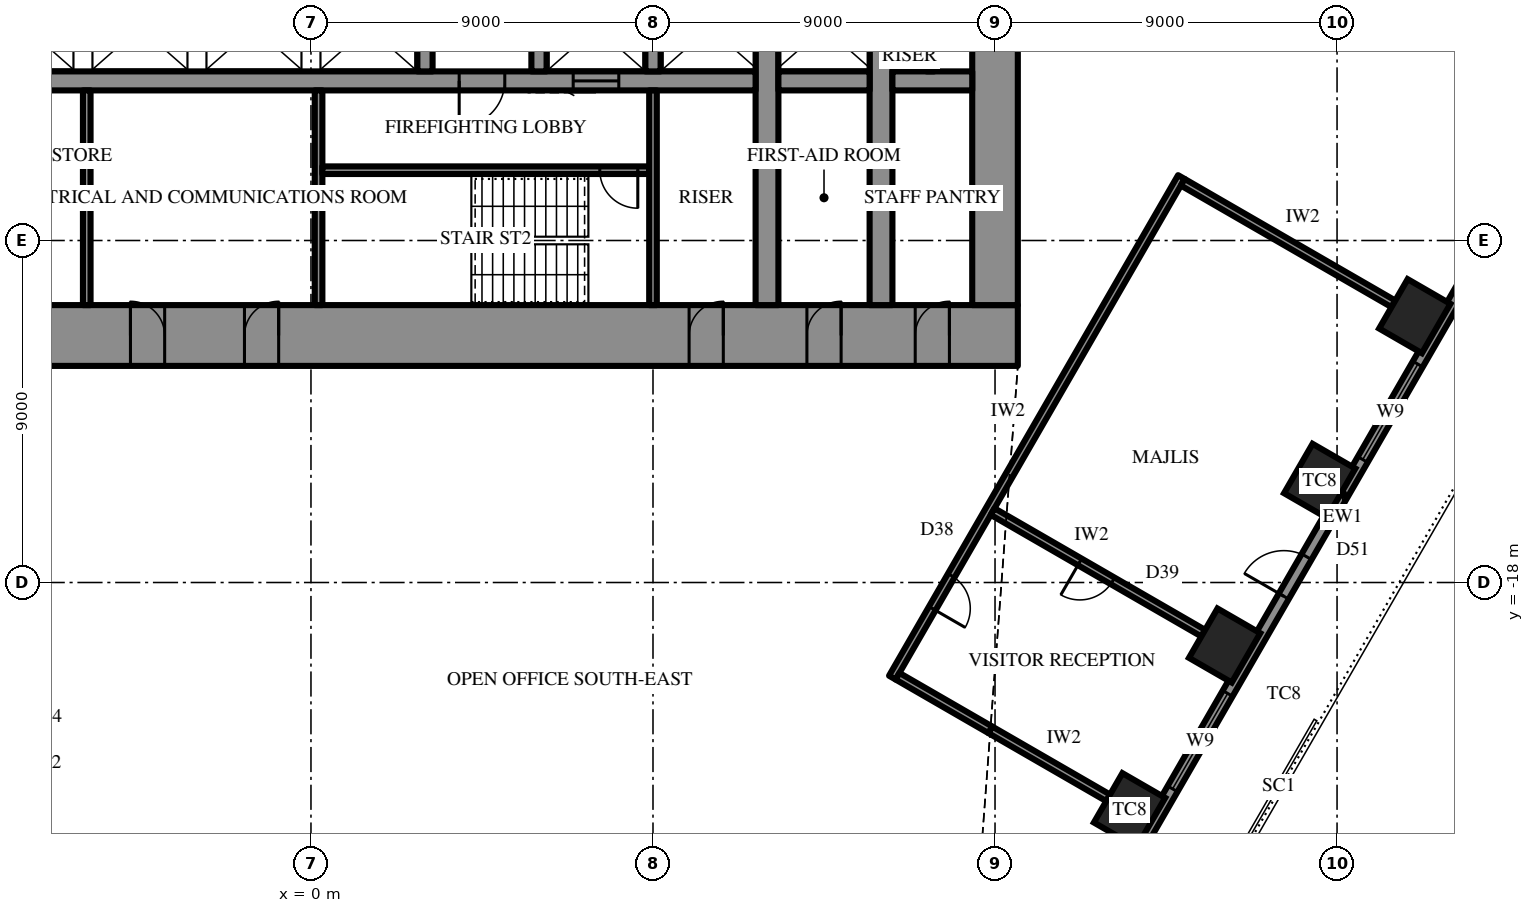
"""IFC4 building model, lengths in metres.
Left out: names, types, materials, properties, quantities, classifications, styles, units other than length and angle.
Written with IfcOpenShell. Run it as: python <this file> out.ifc"""

import sys

from ifc_helpers import new_model, si_unit, direction, frame, frame_2d, origin, origin_2d, place, context, subcontext, project, spatial, rectangle, extrude, element, fill, save


model = new_model("IFC4")
c1 = context("Model", 3, precision=1e-05, world=origin(), true_north=direction((0.0, 1.0)))
c2 = subcontext(c1, "Body", "Model", "MODEL_VIEW")
j1 = project(units=[si_unit("LENGTHUNIT", "METRE"), si_unit("PLANEANGLEUNIT", "RADIAN")], contexts=[c1])
p1 = place(None, origin())
s1 = spatial("IfcSite", under=j1, at=p1, CompositionType="ELEMENT")
p2 = place(p1, origin())
s2 = spatial("IfcBuilding", under=s1, at=p2, CompositionType="ELEMENT")
p3 = place(p2, frame((0.0, 0.0, 186.7)))
s3 = spatial("IfcBuildingStorey", under=s2, at=p3, CompositionType="ELEMENT", Elevation=186.7)
for number, where, z_axis, x_axis in (
    (1, (21.54, -23.992, 0.0), (0.0, 0.0, 1.0), (0.5, 0.866, 0.0)),
    (2, (24.042, -19.658, 0.0), (0.0, 0.0, 1.0), (0.5, 0.866, 0.0)),
    (3, (26.544, -15.325, 0.0), (0.0, 0.0, 1.0), (0.5, 0.866, 0.0)),
    (4, (29.045, -10.992, 0.0), (0.0, 0.0, 1.0), (0.5, 0.866, 0.0)),
):
    element("IfcColumn", number, at=place(p3, frame(where, z_axis=z_axis, x_axis=x_axis)), inside=s3, PredefinedType="COLUMN", context=c2, shape_type="SweptSolid", body=[
        extrude(rectangle(XDim=1.5, YDim=1.3, at=origin_2d()), origin(), (0.0, 0.0, 1.0), 4.2),
    ])
p4 = place(p3, frame((18.6, -11.5, 0.0), z_axis=(0.0, 0.0, 1.0), x_axis=(-1.0, 0.0, 0.0)))
e5 = element("IfcWall", 5, at=p4, inside=s3, PredefinedType="SHEAR", context=c2, shape_type="SweptSolid", body=[
    extrude(rectangle(XDim=37.2, YDim=1.6, at=frame_2d((18.6, 0.0))), origin(), (0.0, 0.0, 1.0), 4.2),
])
p5 = place(p4, frame((19.45, 0.0, 0.0)))
e6 = element("IfcOpeningElement", 6, at=p5, cuts=e5, PredefinedType="OPENING", context=c2, shape_type="SweptSolid", body=[
    extrude(rectangle(XDim=0.9, YDim=2.2, at=frame_2d((0.45, 1.1))), frame((0.0, 0.81, 0.0), z_axis=(0.0, -1.0, 0.0), x_axis=(1.0, 0.0, 0.0)), (0.0, 0.0, 1.0), 1.62),
])
p6 = place(p4, frame((22.45, 0.0, 0.0)))
e7 = element("IfcOpeningElement", 7, at=p6, cuts=e5, PredefinedType="OPENING", context=c2, shape_type="SweptSolid", body=[
    extrude(rectangle(XDim=0.9, YDim=2.2, at=frame_2d((0.45, 1.1))), frame((0.0, 0.81, 0.0), z_axis=(0.0, -1.0, 0.0), x_axis=(1.0, 0.0, 0.0)), (0.0, 0.0, 1.0), 1.62),
])
p7 = place(p4, frame((25.5, 0.0, 0.0)))
e8 = element("IfcOpeningElement", 8, at=p7, cuts=e5, PredefinedType="OPENING", context=c2, shape_type="SweptSolid", body=[
    extrude(rectangle(XDim=1.0, YDim=2.2, at=frame_2d((0.5, 1.1))), frame((0.0, 0.81, 0.0), z_axis=(0.0, -1.0, 0.0), x_axis=(1.0, 0.0, 0.0)), (0.0, 0.0, 1.0), 1.62),
])
p8 = place(p4, frame((1.8, 0.0, 0.0)))
e9 = element("IfcOpeningElement", 9, at=p8, cuts=e5, PredefinedType="OPENING", context=c2, shape_type="SweptSolid", body=[
    extrude(rectangle(XDim=0.9, YDim=2.2, at=frame_2d((0.45, 1.1))), frame((0.0, 0.81, 0.0), z_axis=(0.0, -1.0, 0.0), x_axis=(1.0, 0.0, 0.0)), (0.0, 0.0, 1.0), 1.62),
])
p9 = place(p4, frame((4.65, 0.0, 0.0)))
e10 = element("IfcOpeningElement", 10, at=p9, cuts=e5, PredefinedType="OPENING", context=c2, shape_type="SweptSolid", body=[
    extrude(rectangle(XDim=0.9, YDim=2.2, at=frame_2d((0.45, 1.1))), frame((0.0, 0.81, 0.0), z_axis=(0.0, -1.0, 0.0), x_axis=(1.0, 0.0, 0.0)), (0.0, 0.0, 1.0), 1.62),
])
p10 = place(p4, frame((7.75, 0.0, 0.0)))
e11 = element("IfcOpeningElement", 11, at=p10, cuts=e5, PredefinedType="OPENING", context=c2, shape_type="SweptSolid", body=[
    extrude(rectangle(XDim=0.9, YDim=2.2, at=frame_2d((0.45, 1.1))), frame((0.0, 0.81, 0.0), z_axis=(0.0, -1.0, 0.0), x_axis=(1.0, 0.0, 0.0)), (0.0, 0.0, 1.0), 1.62),
])
p11 = place(p4, frame((28.55, 0.0, 0.0)))
e12 = element("IfcOpeningElement", 12, at=p11, cuts=e5, PredefinedType="OPENING", context=c2, shape_type="SweptSolid", body=[
    extrude(rectangle(XDim=0.9, YDim=2.2, at=frame_2d((0.45, 1.1))), frame((0.0, 0.81, 0.0), z_axis=(0.0, -1.0, 0.0), x_axis=(1.0, 0.0, 0.0)), (0.0, 0.0, 1.0), 1.62),
])
p12 = place(p4, frame((31.65, 0.0, 0.0)))
e13 = element("IfcOpeningElement", 13, at=p12, cuts=e5, PredefinedType="OPENING", context=c2, shape_type="SweptSolid", body=[
    extrude(rectangle(XDim=0.9, YDim=2.2, at=frame_2d((0.45, 1.1))), frame((0.0, 0.81, 0.0), z_axis=(0.0, -1.0, 0.0), x_axis=(1.0, 0.0, 0.0)), (0.0, 0.0, 1.0), 1.62),
])
p13 = place(p4, frame((34.5, 0.0, 0.0)))
e14 = element("IfcOpeningElement", 14, at=p13, cuts=e5, PredefinedType="OPENING", context=c2, shape_type="SweptSolid", body=[
    extrude(rectangle(XDim=0.9, YDim=2.2, at=frame_2d((0.45, 1.1))), frame((0.0, 0.81, 0.0), z_axis=(0.0, -1.0, 0.0), x_axis=(1.0, 0.0, 0.0)), (0.0, 0.0, 1.0), 1.62),
])
p14 = place(p3, frame((18.0, -10.7, 0.0), z_axis=(0.0, 0.0, 1.0), x_axis=(0.0, 1.0, 0.0)))
e15 = element("IfcWall", 15, at=p14, inside=s3, PredefinedType="SHEAR", context=c2, shape_type="SweptSolid", body=[
    extrude(rectangle(XDim=21.4, YDim=1.2, at=frame_2d((10.7, 0.0))), origin(), (0.0, 0.0, 1.0), 4.2),
])
p15 = place(p14, frame((9.8, 0.0, 0.0)))
e16 = element("IfcOpeningElement", 16, at=p15, cuts=e15, PredefinedType="OPENING", context=c2, shape_type="SweptSolid", body=[
    extrude(rectangle(XDim=1.8, YDim=2.4, at=frame_2d((0.9, 1.2))), frame((0.0, 0.61, 0.0), z_axis=(0.0, -1.0, 0.0), x_axis=(1.0, 0.0, 0.0)), (0.0, 0.0, 1.0), 1.22),
])
p16 = place(p3, frame((12.0, -10.7, 0.0), z_axis=(0.0, 0.0, 1.0), x_axis=(0.0, 1.0, 0.0)))
e17 = element("IfcWall", 17, at=p16, inside=s3, PredefinedType="SHEAR", context=c2, shape_type="SweptSolid", body=[
    extrude(rectangle(XDim=21.4, YDim=0.6, at=frame_2d((10.7, 0.0))), origin(), (0.0, 0.0, 1.0), 4.2),
])
p17 = place(p16, frame((9.8, 0.0, 0.0)))
e18 = element("IfcOpeningElement", 18, at=p17, cuts=e17, PredefinedType="OPENING", context=c2, shape_type="SweptSolid", body=[
    extrude(rectangle(XDim=1.8, YDim=2.4, at=frame_2d((0.9, 1.2))), frame((0.0, 0.31, 0.0), z_axis=(0.0, -1.0, 0.0), x_axis=(1.0, 0.0, 0.0)), (0.0, 0.0, 1.0), 0.62),
])
p18 = place(p3, frame((15.0, -10.7, 0.0), z_axis=(0.0, 0.0, 1.0), x_axis=(0.0, 1.0, 0.0)))
e19 = element("IfcWall", 19, at=p18, inside=s3, PredefinedType="SHEAR", context=c2, shape_type="SweptSolid", body=[
    extrude(rectangle(XDim=21.4, YDim=0.6, at=frame_2d((10.7, 0.0))), origin(), (0.0, 0.0, 1.0), 4.2),
])
p19 = place(p18, frame((9.8, 0.0, 0.0)))
e20 = element("IfcOpeningElement", 20, at=p19, cuts=e19, PredefinedType="OPENING", context=c2, shape_type="SweptSolid", body=[
    extrude(rectangle(XDim=1.8, YDim=2.4, at=frame_2d((0.9, 1.2))), frame((0.0, 0.31, 0.0), z_axis=(0.0, -1.0, 0.0), x_axis=(1.0, 0.0, 0.0)), (0.0, 0.0, 1.0), 0.62),
])
p20 = place(p3, frame((17.4, -4.8, 0.0), z_axis=(0.0, 0.0, 1.0), x_axis=(-1.0, 0.0, 0.0)))
e21 = element("IfcWall", 21, at=p20, inside=s3, PredefinedType="SHEAR", context=c2, shape_type="SweptSolid", body=[
    extrude(rectangle(XDim=2.1, YDim=0.5, at=frame_2d((1.05, 0.0))), origin(), (0.0, 0.0, 1.0), 4.2),
])
p21 = place(p3, frame((14.7, -4.8, 0.0), z_axis=(0.0, 0.0, 1.0), x_axis=(-1.0, 0.0, 0.0)))
e22 = element("IfcWall", 22, at=p21, inside=s3, PredefinedType="SHEAR", context=c2, shape_type="SweptSolid", body=[
    extrude(rectangle(XDim=2.4, YDim=0.5, at=frame_2d((1.2, 0.0))), origin(), (0.0, 0.0, 1.0), 4.2),
])
p22 = place(p3, frame((11.7, -4.8, 0.0), z_axis=(0.0, 0.0, 1.0), x_axis=(-1.0, 0.0, 0.0)))
e23 = element("IfcWall", 23, at=p22, inside=s3, PredefinedType="SHEAR", context=c2, shape_type="SweptSolid", body=[
    extrude(rectangle(XDim=23.4, YDim=0.5, at=frame_2d((11.7, 0.0))), origin(), (0.0, 0.0, 1.0), 4.2),
])
p23 = place(p22, frame((6.6, 0.0, 0.0)))
e24 = element("IfcOpeningElement", 24, at=p23, cuts=e23, PredefinedType="OPENING", context=c2, shape_type="SweptSolid", body=[
    extrude(rectangle(XDim=1.2, YDim=2.2, at=frame_2d((0.6, 1.1))), frame((0.0, 0.26, 0.0), z_axis=(0.0, -1.0, 0.0), x_axis=(1.0, 0.0, 0.0)), (0.0, 0.0, 1.0), 0.52),
])
p24 = place(p22, frame((3.6, 0.0, 0.0)))
e25 = element("IfcOpeningElement", 25, at=p24, cuts=e23, PredefinedType="OPENING", context=c2, shape_type="SweptSolid", body=[
    extrude(rectangle(XDim=1.2, YDim=2.2, at=frame_2d((0.6, 1.1))), frame((0.0, 0.26, 0.0), z_axis=(0.0, -1.0, 0.0), x_axis=(1.0, 0.0, 0.0)), (0.0, 0.0, 1.0), 0.52),
])
for number, where, z_axis, x_axis in (
    (26, (9.0, -2.25, 0.0), (0.0, 0.0, 1.0), (0.0, -1.0, 0.0)),
    (27, (6.0, -2.25, 0.0), (0.0, 0.0, 1.0), (0.0, -1.0, 0.0)),
    (28, (3.0, -2.25, 0.0), (0.0, 0.0, 1.0), (0.0, -1.0, 0.0)),
):
    element("IfcWall", number, at=place(p3, frame(where, z_axis=z_axis, x_axis=x_axis)), inside=s3, PredefinedType="SHEAR", context=c2, shape_type="SweptSolid", body=[
        extrude(rectangle(XDim=2.3, YDim=0.4, at=frame_2d((1.15, 0.0))), origin(), (0.0, 0.0, 1.0), 4.2),
    ])
p25 = place(p3, frame((0.2, -5.05, 0.0), z_axis=(0.0, 0.0, 1.0), x_axis=(0.0, -1.0, 0.0)))
e29 = element("IfcWall", 29, at=p25, inside=s3, PredefinedType="SHEAR", context=c2, shape_type="SweptSolid", body=[
    extrude(rectangle(XDim=5.65, YDim=0.2, at=frame_2d((2.825, 0.0))), origin(), (0.0, 0.0, 1.0), 4.2),
])
p26 = place(p3, frame((8.9, -7.15, 0.0), z_axis=(0.0, 0.0, 1.0), x_axis=(-1.0, 0.0, 0.0)))
e30 = element("IfcWall", 30, at=p26, inside=s3, PredefinedType="SHEAR", context=c2, shape_type="SweptSolid", body=[
    extrude(rectangle(XDim=8.6, YDim=0.2, at=frame_2d((4.3, 0.0))), origin(), (0.0, 0.0, 1.0), 4.2),
])
p27 = place(p26, frame((0.3, 0.0, 0.0)))
e31 = element("IfcOpeningElement", 31, at=p27, cuts=e30, PredefinedType="OPENING", context=c2, shape_type="SweptSolid", body=[
    extrude(rectangle(XDim=1.0, YDim=2.2, at=frame_2d((0.5, 1.1))), frame((0.0, 0.11, 0.0), z_axis=(0.0, -1.0, 0.0), x_axis=(1.0, 0.0, 0.0)), (0.0, 0.0, 1.0), 0.22),
])
p28 = place(p3, frame((19.644, -28.675, 0.0), z_axis=(0.0, 0.0, 1.0), x_axis=(0.500003084452, 0.866023622968, 0.0)))
e32 = element("IfcWall", 32, at=p28, inside=s3, PredefinedType="SOLIDWALL", context=c2, shape_type="SweptSolid", body=[
    extrude(rectangle(XDim=30.022, YDim=0.3, at=frame_2d((15.011, 0.0))), origin(), (0.0, 0.0, 1.0), 2.75),
])
p29 = place(p28, frame((1.052, 0.0, 0.6)))
e33 = element("IfcOpeningElement", 33, at=p29, cuts=e32, PredefinedType="OPENING", context=c2, shape_type="SweptSolid", body=[
    extrude(rectangle(XDim=2.9, YDim=1.9, at=frame_2d((1.45, 0.95))), frame((0.0, 0.16, 0.0), z_axis=(0.0, -1.0, 0.0), x_axis=(1.0, 0.0, 0.0)), (0.0, 0.0, 1.0), 0.32),
])
p30 = place(p28, frame((6.056, 0.0, 0.6)))
e34 = element("IfcOpeningElement", 34, at=p30, cuts=e32, PredefinedType="OPENING", context=c2, shape_type="SweptSolid", body=[
    extrude(rectangle(XDim=2.9, YDim=1.9, at=frame_2d((1.45, 0.95))), frame((0.0, 0.16, 0.0), z_axis=(0.0, -1.0, 0.0), x_axis=(1.0, 0.0, 0.0)), (0.0, 0.0, 1.0), 0.32),
])
p31 = place(p28, frame((11.909, 0.0, 0.0)))
e35 = element("IfcOpeningElement", 35, at=p31, cuts=e32, PredefinedType="OPENING", context=c2, shape_type="SweptSolid", body=[
    extrude(rectangle(XDim=1.2, YDim=2.4, at=frame_2d((0.6, 1.2))), frame((0.0, 0.16, 0.0), z_axis=(0.0, -1.0, 0.0), x_axis=(1.0, 0.0, 0.0)), (0.0, 0.0, 1.0), 0.32),
])
p32 = place(p28, frame((16.063, 0.0, 0.6)))
e36 = element("IfcOpeningElement", 36, at=p32, cuts=e32, PredefinedType="OPENING", context=c2, shape_type="SweptSolid", body=[
    extrude(rectangle(XDim=2.9, YDim=1.9, at=frame_2d((1.45, 0.95))), frame((0.0, 0.16, 0.0), z_axis=(0.0, -1.0, 0.0), x_axis=(1.0, 0.0, 0.0)), (0.0, 0.0, 1.0), 0.32),
])
p33 = place(p28, frame((21.067, 0.0, 0.6)))
e37 = element("IfcOpeningElement", 37, at=p33, cuts=e32, PredefinedType="OPENING", context=c2, shape_type="SweptSolid", body=[
    extrude(rectangle(XDim=2.9, YDim=1.9, at=frame_2d((1.45, 0.95))), frame((0.0, 0.16, 0.0), z_axis=(0.0, -1.0, 0.0), x_axis=(1.0, 0.0, 0.0)), (0.0, 0.0, 1.0), 0.32),
])
p34 = place(p28, frame((26.07, 0.0, 0.6)))
e38 = element("IfcOpeningElement", 38, at=p34, cuts=e32, PredefinedType="OPENING", context=c2, shape_type="SweptSolid", body=[
    extrude(rectangle(XDim=2.9, YDim=1.9, at=frame_2d((1.45, 0.95))), frame((0.0, 0.16, 0.0), z_axis=(0.0, -1.0, 0.0), x_axis=(1.0, 0.0, 0.0)), (0.0, 0.0, 1.0), 0.32),
])
for number, where, z_axis, x_axis in (
    (39, (9.0, -5.05, 0.0), (0.0, 0.0, 1.0), (0.0, -1.0, 0.0)),
    (40, (-5.9, -5.05, 0.0), (0.0, 0.0, 1.0), (0.0, -1.0, 0.0)),
):
    element("IfcWall", number, at=place(p3, frame(where, z_axis=z_axis, x_axis=x_axis)), inside=s3, PredefinedType="PARTITIONING", context=c2, shape_type="SweptSolid", body=[
        extrude(rectangle(XDim=5.65, YDim=0.2, at=frame_2d((2.825, 0.0))), origin(), (0.0, 0.0, 1.0), 4.0),
    ])
p35 = place(p3, frame((16.3, -3.55, 0.0), z_axis=(0.0, 0.0, 1.0), x_axis=(0.0, -1.0, 0.0)))
e41 = element("IfcWall", 41, at=p35, inside=s3, PredefinedType="PARTITIONING", context=c2, shape_type="SweptSolid", body=[
    extrude(rectangle(XDim=1.0, YDim=0.2, at=frame_2d((0.5, 0.0))), origin(), (0.0, 0.0, 1.0), 4.0),
])
p36 = place(p3, frame((15.298, -20.503, 0.0), z_axis=(0.0, 0.0, 1.0), x_axis=(0.500010972563, 0.86601906868, 0.0)))
e42 = element("IfcWall", 42, at=p36, inside=s3, PredefinedType="PARTITIONING", context=c2, shape_type="SweptSolid", body=[
    extrude(rectangle(XDim=15.211, YDim=0.2, at=frame_2d((7.605, 0.0))), origin(), (0.0, 0.0, 1.0), 4.0),
])
p37 = place(p36, frame((2.102, 0.0, 0.0)))
e43 = element("IfcOpeningElement", 43, at=p37, cuts=e42, PredefinedType="OPENING", context=c2, shape_type="SweptSolid", body=[
    extrude(rectangle(XDim=1.0, YDim=2.2, at=frame_2d((0.5, 1.1))), frame((0.0, 0.11, 0.0), z_axis=(0.0, -1.0, 0.0), x_axis=(1.0, 0.0, 0.0)), (0.0, 0.0, 1.0), 0.22),
])
p38 = place(p3, frame((15.435, -20.467, 0.0), z_axis=(0.0, 0.0, 1.0), x_axis=(0.866008320966, -0.500029587143, 0.0)))
e44 = element("IfcWall", 44, at=p38, inside=s3, PredefinedType="PARTITIONING", context=c2, shape_type="SweptSolid", body=[
    extrude(rectangle(XDim=2.821, YDim=0.2, at=frame_2d((1.411, 0.0))), origin(), (0.0, 0.0, 1.0), 4.0),
])
p39 = place(p3, frame((17.878, -21.877, 0.0), z_axis=(0.0, 0.0, 1.0), x_axis=(0.866009501729, -0.500027542156, 0.0)))
e45 = element("IfcWall", 45, at=p39, inside=s3, PredefinedType="PARTITIONING", context=c2, shape_type="SweptSolid", body=[
    extrude(rectangle(XDim=3.579, YDim=0.2, at=frame_2d((1.79, 0.0))), origin(), (0.0, 0.0, 1.0), 3.082),
])
p40 = place(p3, frame((17.936, -16.133, 0.0), z_axis=(0.0, 0.0, 1.0), x_axis=(0.866035036182, -0.499983315828, 0.0)))
e46 = element("IfcWall", 46, at=p40, inside=s3, PredefinedType="PARTITIONING", context=c2, shape_type="SweptSolid", body=[
    extrude(rectangle(XDim=6.4, YDim=0.2, at=frame_2d((3.2, 0.0))), origin(), (0.0, 0.0, 1.0), 3.082),
])
p41 = place(p40, frame((2.65, 0.0, 0.0)))
e47 = element("IfcOpeningElement", 47, at=p41, cuts=e46, PredefinedType="OPENING", context=c2, shape_type="SweptSolid", body=[
    extrude(rectangle(XDim=1.0, YDim=2.2, at=frame_2d((0.5, 1.1))), frame((0.0, 0.11, 0.0), z_axis=(0.0, -1.0, 0.0), x_axis=(1.0, 0.0, 0.0)), (0.0, 0.0, 1.0), 0.22),
])
p42 = place(p3, frame((22.94, -7.467, 0.0), z_axis=(0.0, 0.0, 1.0), x_axis=(0.866018518567, -0.500011925357, 0.0)))
e48 = element("IfcWall", 48, at=p42, inside=s3, PredefinedType="PARTITIONING", context=c2, shape_type="SweptSolid", body=[
    extrude(rectangle(XDim=6.4, YDim=0.2, at=frame_2d((3.2, 0.0))), origin(), (0.0, 0.0, 1.0), 3.082),
])
p43 = place(p30, origin())
e49 = element("IfcWindow", 49, at=p43, inside=s3, PartitioningType="SINGLE_PANEL", PredefinedType="WINDOW", context=c2, shape_type="SweptSolid", body=[
    extrude(rectangle(XDim=2.9, YDim=1.9, at=frame_2d((1.45, 0.95))), frame((0.0, 0.03, 0.0), z_axis=(0.0, -1.0, 0.0), x_axis=(1.0, 0.0, 0.0)), (0.0, 0.0, 1.0), 0.06),
])
fill(e34, e49)
p44 = place(p31, origin())
e50 = element("IfcDoor", 50, at=p44, inside=s3, OperationType="SINGLE_SWING_RIGHT", PredefinedType="DOOR", context=c2, shape_type="SweptSolid", body=[
    extrude(rectangle(XDim=1.2, YDim=2.4, at=frame_2d((0.6, 1.2))), frame((0.0, 0.025, 0.0), z_axis=(0.0, -1.0, 0.0), x_axis=(1.0, 0.0, 0.0)), (0.0, 0.0, 1.0), 0.05),
])
fill(e35, e50)
p45 = place(p32, origin())
e51 = element("IfcWindow", 51, at=p45, inside=s3, PartitioningType="SINGLE_PANEL", PredefinedType="WINDOW", context=c2, shape_type="SweptSolid", body=[
    extrude(rectangle(XDim=2.9, YDim=1.9, at=frame_2d((1.45, 0.95))), frame((0.0, 0.03, 0.0), z_axis=(0.0, -1.0, 0.0), x_axis=(1.0, 0.0, 0.0)), (0.0, 0.0, 1.0), 0.06),
])
fill(e36, e51)
p46 = place(p23, origin())
e52 = element("IfcDoor", 52, at=p46, inside=s3, OperationType="SINGLE_SWING_LEFT", PredefinedType="DOOR", context=c2, shape_type="SweptSolid", body=[
    extrude(rectangle(XDim=1.2, YDim=2.2, at=frame_2d((0.6, 1.1))), frame((0.0, 0.025, 0.0), z_axis=(0.0, -1.0, 0.0), x_axis=(1.0, 0.0, 0.0)), (0.0, 0.0, 1.0), 0.05),
])
fill(e24, e52)
p47 = place(p27, origin())
e53 = element("IfcDoor", 53, at=p47, inside=s3, OperationType="SINGLE_SWING_RIGHT", PredefinedType="DOOR", context=c2, shape_type="SweptSolid", body=[
    extrude(rectangle(XDim=1.0, YDim=2.2, at=frame_2d((0.5, 1.1))), frame((0.0, 0.025, 0.0), z_axis=(0.0, -1.0, 0.0), x_axis=(1.0, 0.0, 0.0)), (0.0, 0.0, 1.0), 0.05),
])
fill(e31, e53)
p48 = place(p5, frame((0.9, 0.0, 0.0), z_axis=(0.0, 0.0, 1.0), x_axis=(-1.0, 0.0, 0.0)))
e54 = element("IfcDoor", 54, at=p48, inside=s3, OperationType="SINGLE_SWING_LEFT", PredefinedType="DOOR", context=c2, shape_type="SweptSolid", body=[
    extrude(rectangle(XDim=0.9, YDim=2.2, at=frame_2d((0.45, 1.1))), frame((0.0, 0.025, 0.0), z_axis=(0.0, -1.0, 0.0), x_axis=(1.0, 0.0, 0.0)), (0.0, 0.0, 1.0), 0.05),
])
fill(e6, e54)
p49 = place(p6, frame((0.9, 0.0, 0.0), z_axis=(0.0, 0.0, 1.0), x_axis=(-1.0, 0.0, 0.0)))
e55 = element("IfcDoor", 55, at=p49, inside=s3, OperationType="SINGLE_SWING_RIGHT", PredefinedType="DOOR", context=c2, shape_type="SweptSolid", body=[
    extrude(rectangle(XDim=0.9, YDim=2.2, at=frame_2d((0.45, 1.1))), frame((0.0, 0.025, 0.0), z_axis=(0.0, -1.0, 0.0), x_axis=(1.0, 0.0, 0.0)), (0.0, 0.0, 1.0), 0.05),
])
fill(e7, e55)
p50 = place(p8, frame((0.9, 0.0, 0.0), z_axis=(0.0, 0.0, 1.0), x_axis=(-1.0, 0.0, 0.0)))
e56 = element("IfcDoor", 56, at=p50, inside=s3, OperationType="SINGLE_SWING_LEFT", PredefinedType="DOOR", context=c2, shape_type="SweptSolid", body=[
    extrude(rectangle(XDim=0.9, YDim=2.2, at=frame_2d((0.45, 1.1))), frame((0.0, 0.025, 0.0), z_axis=(0.0, -1.0, 0.0), x_axis=(1.0, 0.0, 0.0)), (0.0, 0.0, 1.0), 0.05),
])
fill(e9, e56)
p51 = place(p9, frame((0.9, 0.0, 0.0), z_axis=(0.0, 0.0, 1.0), x_axis=(-1.0, 0.0, 0.0)))
e57 = element("IfcDoor", 57, at=p51, inside=s3, OperationType="SINGLE_SWING_LEFT", PredefinedType="DOOR", context=c2, shape_type="SweptSolid", body=[
    extrude(rectangle(XDim=0.9, YDim=2.2, at=frame_2d((0.45, 1.1))), frame((0.0, 0.025, 0.0), z_axis=(0.0, -1.0, 0.0), x_axis=(1.0, 0.0, 0.0)), (0.0, 0.0, 1.0), 0.05),
])
fill(e10, e57)
p52 = place(p10, frame((0.9, 0.0, 0.0), z_axis=(0.0, 0.0, 1.0), x_axis=(-1.0, 0.0, 0.0)))
e58 = element("IfcDoor", 58, at=p52, inside=s3, OperationType="SINGLE_SWING_LEFT", PredefinedType="DOOR", context=c2, shape_type="SweptSolid", body=[
    extrude(rectangle(XDim=0.9, YDim=2.2, at=frame_2d((0.45, 1.1))), frame((0.0, 0.025, 0.0), z_axis=(0.0, -1.0, 0.0), x_axis=(1.0, 0.0, 0.0)), (0.0, 0.0, 1.0), 0.05),
])
fill(e11, e58)
p53 = place(p24, origin())
e59 = element("IfcDoor", 59, at=p53, inside=s3, OperationType="SLIDING_TO_LEFT", PredefinedType="DOOR", context=c2, shape_type="SweptSolid", body=[
    extrude(rectangle(XDim=1.2, YDim=2.2, at=frame_2d((0.6, 1.1))), frame((0.0, 0.025, 0.0), z_axis=(0.0, -1.0, 0.0), x_axis=(1.0, 0.0, 0.0)), (0.0, 0.0, 1.0), 0.05),
])
fill(e25, e59)
p54 = place(p37, frame((1.0, 0.0, 0.0), z_axis=(0.0, 0.0, 1.0), x_axis=(-1.0, 0.0, 0.0)))
e60 = element("IfcDoor", 60, at=p54, inside=s3, OperationType="SINGLE_SWING_LEFT", PredefinedType="DOOR", context=c2, shape_type="SweptSolid", body=[
    extrude(rectangle(XDim=1.0, YDim=2.2, at=frame_2d((0.5, 1.1))), frame((0.0, 0.025, 0.0), z_axis=(0.0, -1.0, 0.0), x_axis=(1.0, 0.0, 0.0)), (0.0, 0.0, 1.0), 0.05),
])
fill(e43, e60)
p55 = place(p41, frame((1.0, 0.0, 0.0), z_axis=(0.0, 0.0, 1.0), x_axis=(-1.0, 0.0, 0.0)))
e61 = element("IfcDoor", 61, at=p55, inside=s3, OperationType="SINGLE_SWING_LEFT", PredefinedType="DOOR", context=c2, shape_type="SweptSolid", body=[
    extrude(rectangle(XDim=1.0, YDim=2.2, at=frame_2d((0.5, 1.1))), frame((0.0, 0.025, 0.0), z_axis=(0.0, -1.0, 0.0), x_axis=(1.0, 0.0, 0.0)), (0.0, 0.0, 1.0), 0.05),
])
fill(e47, e61)
save(model, sys.argv[1])
